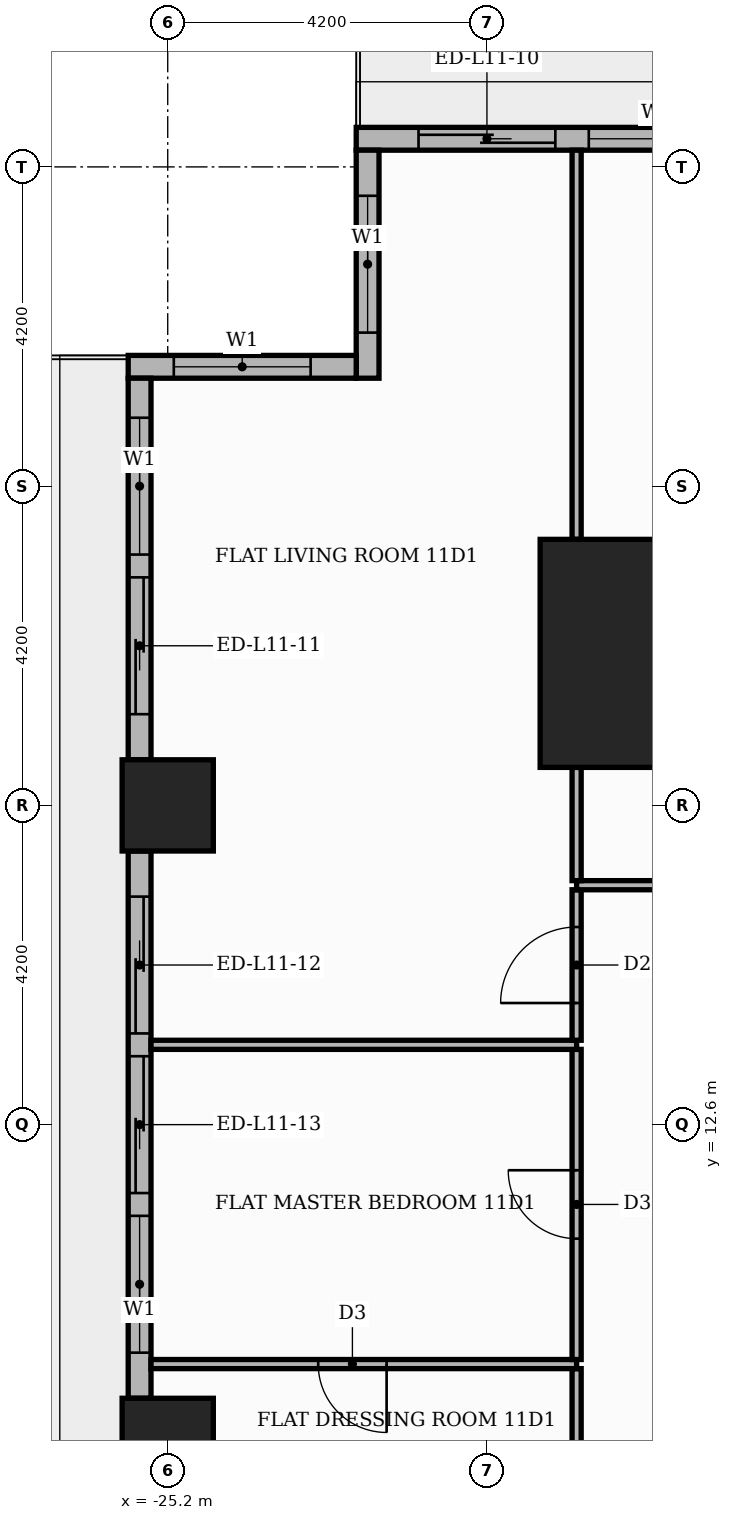
"""IFC4 building model, lengths in metres.
Left out: names, types, materials, properties, quantities, classifications, styles, units other than length and angle.
Written with IfcOpenShell. Run it as: python <this file> out.ifc"""

import sys

from ifc_helpers import new_model, si_unit, direction, frame, frame_2d, origin, origin_2d, place, context, subcontext, project, spatial, rectangle, extrude, element, fill, save


model = new_model("IFC4")
c1 = context("Model", 3, precision=1e-05, world=origin(), true_north=direction((0.0, 1.0)))
c2 = subcontext(c1, "Body", "Model", "MODEL_VIEW")
j1 = project(units=[si_unit("LENGTHUNIT", "METRE"), si_unit("PLANEANGLEUNIT", "RADIAN")], contexts=[c1])
p1 = place(None, origin())
s1 = spatial("IfcSite", under=j1, at=p1, CompositionType="ELEMENT")
p2 = place(p1, origin())
s2 = spatial("IfcBuilding", under=s1, at=p2, CompositionType="ELEMENT")
p3 = place(p2, frame((0.0, 0.0, 50.4)))
s3 = spatial("IfcBuildingStorey", under=s2, at=p3, CompositionType="ELEMENT", Elevation=50.4)
p4 = place(p3, frame((-18.8, 18.8, 0.0), z_axis=(0.0, 0.0, 1.0), x_axis=(1.0, 0.0, 0.0)))
e1 = element("IfcColumn", 1, at=p4, inside=s3, PredefinedType="COLUMN", context=c2, shape_type="SweptSolid", body=[
    extrude(rectangle(XDim=3.0, YDim=3.0, at=origin_2d()), origin(), (0.0, 0.0, 1.0), 3.9),
])
for number, where, z_axis, x_axis in (
    (2, (-25.2, 8.4, 0.0), (0.0, 0.0, 1.0), (1.0, 0.0, 0.0)),
    (3, (-25.2, 16.8, 0.0), (0.0, 0.0, 1.0), (1.0, 0.0, 0.0)),
):
    element("IfcColumn", number, at=place(p3, frame(where, z_axis=z_axis, x_axis=x_axis)), inside=s3, PredefinedType="COLUMN", context=c2, shape_type="SweptSolid", body=[
        extrude(rectangle(XDim=1.2, YDim=1.2, at=origin_2d()), origin(), (0.0, 0.0, 1.0), 3.9),
    ])
p5 = place(p3, frame((-17.4, 25.57, 0.0), z_axis=(0.0, 0.0, 1.0), x_axis=(-1.0, 0.0, 0.0)))
e4 = element("IfcWall", 4, at=p5, inside=s3, PredefinedType="STANDARD", context=c2, shape_type="SweptSolid", body=[
    extrude(rectangle(XDim=5.32, YDim=0.3, at=frame_2d((2.66, 0.0))), origin(), (0.0, 0.0, 1.0), 3.48),
])
p6 = place(p5, frame((2.7, 0.0, 0.0)))
e5 = element("IfcOpeningElement", 5, at=p6, cuts=e4, PredefinedType="OPENING", context=c2, shape_type="SweptSolid", body=[
    extrude(rectangle(XDim=1.8, YDim=2.4, at=frame_2d((0.9, 1.2))), frame((0.0, 0.16, 0.0), z_axis=(0.0, -1.0, 0.0), x_axis=(1.0, 0.0, 0.0)), (0.0, 0.0, 1.0), 0.32),
])
p7 = place(p5, frame((0.46, 0.0, 0.9)))
e6 = element("IfcOpeningElement", 6, at=p7, cuts=e4, PredefinedType="OPENING", context=c2, shape_type="SweptSolid", body=[
    extrude(rectangle(XDim=1.8, YDim=2.1, at=frame_2d((0.9, 1.05))), frame((0.0, 0.16, 0.0), z_axis=(0.0, -1.0, 0.0), x_axis=(1.0, 0.0, 0.0)), (0.0, 0.0, 1.0), 0.32),
])
p8 = place(p3, frame((-22.57, 25.42, 0.0), z_axis=(0.0, 0.0, 1.0), x_axis=(0.0, -1.0, 0.0)))
e7 = element("IfcWall", 7, at=p8, inside=s3, PredefinedType="STANDARD", context=c2, shape_type="SweptSolid", body=[
    extrude(rectangle(XDim=3.0, YDim=0.3, at=frame_2d((1.5, 0.0))), origin(), (0.0, 0.0, 1.0), 3.48),
])
p9 = place(p8, frame((0.6, 0.0, 0.9)))
e8 = element("IfcOpeningElement", 8, at=p9, cuts=e7, PredefinedType="OPENING", context=c2, shape_type="SweptSolid", body=[
    extrude(rectangle(XDim=1.8, YDim=2.1, at=frame_2d((0.9, 1.05))), frame((0.0, 0.16, 0.0), z_axis=(0.0, -1.0, 0.0), x_axis=(1.0, 0.0, 0.0)), (0.0, 0.0, 1.0), 0.32),
])
p10 = place(p3, frame((-22.72, 22.57, 0.0), z_axis=(0.0, 0.0, 1.0), x_axis=(-1.0, 0.0, 0.0)))
e9 = element("IfcWall", 9, at=p10, inside=s3, PredefinedType="STANDARD", context=c2, shape_type="SweptSolid", body=[
    extrude(rectangle(XDim=3.0, YDim=0.3, at=frame_2d((1.5, 0.0))), origin(), (0.0, 0.0, 1.0), 3.48),
])
p11 = place(p10, frame((0.6, 0.0, 0.9)))
e10 = element("IfcOpeningElement", 10, at=p11, cuts=e9, PredefinedType="OPENING", context=c2, shape_type="SweptSolid", body=[
    extrude(rectangle(XDim=1.8, YDim=2.1, at=frame_2d((0.9, 1.05))), frame((0.0, 0.16, 0.0), z_axis=(0.0, -1.0, 0.0), x_axis=(1.0, 0.0, 0.0)), (0.0, 0.0, 1.0), 0.32),
])
p12 = place(p3, frame((-25.57, 22.42, 0.0), z_axis=(0.0, 0.0, 1.0), x_axis=(0.0, -1.0, 0.0)))
e11 = element("IfcWall", 11, at=p12, inside=s3, PredefinedType="STANDARD", context=c2, shape_type="SweptSolid", body=[
    extrude(rectangle(XDim=5.02, YDim=0.3, at=frame_2d((2.51, 0.0))), origin(), (0.0, 0.0, 1.0), 3.48),
])
p13 = place(p12, frame((0.52, 0.0, 0.9)))
e12 = element("IfcOpeningElement", 12, at=p13, cuts=e11, PredefinedType="OPENING", context=c2, shape_type="SweptSolid", body=[
    extrude(rectangle(XDim=1.8, YDim=2.1, at=frame_2d((0.9, 1.05))), frame((0.0, 0.16, 0.0), z_axis=(0.0, -1.0, 0.0), x_axis=(1.0, 0.0, 0.0)), (0.0, 0.0, 1.0), 0.32),
])
p14 = place(p12, frame((2.62, 0.0, 0.0)))
e13 = element("IfcOpeningElement", 13, at=p14, cuts=e11, PredefinedType="OPENING", context=c2, shape_type="SweptSolid", body=[
    extrude(rectangle(XDim=1.8, YDim=2.4, at=frame_2d((0.9, 1.2))), frame((0.0, 0.16, 0.0), z_axis=(0.0, -1.0, 0.0), x_axis=(1.0, 0.0, 0.0)), (0.0, 0.0, 1.0), 0.32),
])
p15 = place(p3, frame((-25.57, 16.2, 0.0), z_axis=(0.0, 0.0, 1.0), x_axis=(0.0, -1.0, 0.0)))
e14 = element("IfcWall", 14, at=p15, inside=s3, PredefinedType="STANDARD", context=c2, shape_type="SweptSolid", body=[
    extrude(rectangle(XDim=7.2, YDim=0.3, at=frame_2d((3.6, 0.0))), origin(), (0.0, 0.0, 1.0), 3.48),
])
p16 = place(p15, frame((0.6, 0.0, 0.0)))
e15 = element("IfcOpeningElement", 15, at=p16, cuts=e14, PredefinedType="OPENING", context=c2, shape_type="SweptSolid", body=[
    extrude(rectangle(XDim=1.8, YDim=2.4, at=frame_2d((0.9, 1.2))), frame((0.0, 0.16, 0.0), z_axis=(0.0, -1.0, 0.0), x_axis=(1.0, 0.0, 0.0)), (0.0, 0.0, 1.0), 0.32),
])
p17 = place(p15, frame((2.7, 0.0, 0.0)))
e16 = element("IfcOpeningElement", 16, at=p17, cuts=e14, PredefinedType="OPENING", context=c2, shape_type="SweptSolid", body=[
    extrude(rectangle(XDim=1.8, YDim=2.4, at=frame_2d((0.9, 1.2))), frame((0.0, 0.16, 0.0), z_axis=(0.0, -1.0, 0.0), x_axis=(1.0, 0.0, 0.0)), (0.0, 0.0, 1.0), 0.32),
])
p18 = place(p15, frame((4.8, 0.0, 0.9)))
e17 = element("IfcOpeningElement", 17, at=p18, cuts=e14, PredefinedType="OPENING", context=c2, shape_type="SweptSolid", body=[
    extrude(rectangle(XDim=1.8, YDim=2.1, at=frame_2d((0.9, 1.05))), frame((0.0, 0.16, 0.0), z_axis=(0.0, -1.0, 0.0), x_axis=(1.0, 0.0, 0.0)), (0.0, 0.0, 1.0), 0.32),
])
p19 = place(p3, frame((-19.82, 7.41, 0.0), z_axis=(0.0, 0.0, 1.0), x_axis=(0.0, 1.0, 0.0)))
e18 = element("IfcWall", 18, at=p19, inside=s3, PredefinedType="PARTITIONING", context=c2, shape_type="SweptSolid", body=[
    extrude(rectangle(XDim=1.98, YDim=0.12, at=frame_2d((0.99, 0.0))), origin(), (0.0, 0.0, 1.0), 3.48),
])
p20 = place(p3, frame((-25.42, 9.45, 0.0), z_axis=(0.0, 0.0, 1.0), x_axis=(1.0, 0.0, 0.0)))
e19 = element("IfcWall", 19, at=p20, inside=s3, PredefinedType="PARTITIONING", context=c2, shape_type="SweptSolid", body=[
    extrude(rectangle(XDim=5.6, YDim=0.12, at=frame_2d((2.8, 0.0))), origin(), (0.0, 0.0, 1.0), 3.48),
])
p21 = place(p20, frame((2.2, 0.0, 0.0)))
e20 = element("IfcOpeningElement", 20, at=p21, cuts=e19, PredefinedType="OPENING", context=c2, shape_type="SweptSolid", body=[
    extrude(rectangle(XDim=0.9, YDim=2.1, at=frame_2d((0.45, 1.05))), frame((0.0, 0.07, 0.0), z_axis=(0.0, -1.0, 0.0), x_axis=(1.0, 0.0, 0.0)), (0.0, 0.0, 1.0), 0.14),
])
p22 = place(p3, frame((-19.82, 9.51, 0.0), z_axis=(0.0, 0.0, 1.0), x_axis=(0.0, 1.0, 0.0)))
e21 = element("IfcWall", 21, at=p22, inside=s3, PredefinedType="PARTITIONING", context=c2, shape_type="SweptSolid", body=[
    extrude(rectangle(XDim=4.08, YDim=0.12, at=frame_2d((2.04, 0.0))), origin(), (0.0, 0.0, 1.0), 3.48),
])
p23 = place(p22, frame((1.59, 0.0, 0.0)))
e22 = element("IfcOpeningElement", 22, at=p23, cuts=e21, PredefinedType="OPENING", context=c2, shape_type="SweptSolid", body=[
    extrude(rectangle(XDim=0.9, YDim=2.1, at=frame_2d((0.45, 1.05))), frame((0.0, 0.07, 0.0), z_axis=(0.0, -1.0, 0.0), x_axis=(1.0, 0.0, 0.0)), (0.0, 0.0, 1.0), 0.14),
])
p24 = place(p3, frame((-25.42, 13.65, 0.0), z_axis=(0.0, 0.0, 1.0), x_axis=(1.0, 0.0, 0.0)))
e23 = element("IfcWall", 23, at=p24, inside=s3, PredefinedType="PARTITIONING", context=c2, shape_type="SweptSolid", body=[
    extrude(rectangle(XDim=5.6, YDim=0.12, at=frame_2d((2.8, 0.0))), origin(), (0.0, 0.0, 1.0), 3.48),
])
p25 = place(p3, frame((-19.82, 13.71, 0.0), z_axis=(0.0, 0.0, 1.0), x_axis=(0.0, 1.0, 0.0)))
e24 = element("IfcWall", 24, at=p25, inside=s3, PredefinedType="PARTITIONING", context=c2, shape_type="SweptSolid", body=[
    extrude(rectangle(XDim=1.98, YDim=0.12, at=frame_2d((0.99, 0.0))), origin(), (0.0, 0.0, 1.0), 3.48),
])
p26 = place(p25, frame((0.49, 0.0, 0.0)))
e25 = element("IfcOpeningElement", 25, at=p26, cuts=e24, PredefinedType="OPENING", context=c2, shape_type="SweptSolid", body=[
    extrude(rectangle(XDim=1.0, YDim=2.1, at=frame_2d((0.5, 1.05))), frame((0.0, 0.07, 0.0), z_axis=(0.0, -1.0, 0.0), x_axis=(1.0, 0.0, 0.0)), (0.0, 0.0, 1.0), 0.14),
])
p27 = place(p3, frame((-19.82, 15.75, 0.0), z_axis=(0.0, 0.0, 1.0), x_axis=(1.0, 0.0, 0.0)))
e26 = element("IfcWall", 26, at=p27, inside=s3, PredefinedType="PARTITIONING", context=c2, shape_type="SweptSolid", body=[
    extrude(rectangle(XDim=6.07, YDim=0.12, at=frame_2d((3.035, 0.0))), origin(), (0.0, 0.0, 1.0), 3.48),
])
p28 = place(p27, frame((2.585, 0.0, 0.0)))
e27 = element("IfcOpeningElement", 27, at=p28, cuts=e26, PredefinedType="OPENING", context=c2, shape_type="SweptSolid", body=[
    extrude(rectangle(XDim=1.0, YDim=2.1, at=frame_2d((0.5, 1.05))), frame((0.0, 0.07, 0.0), z_axis=(0.0, -1.0, 0.0), x_axis=(1.0, 0.0, 0.0)), (0.0, 0.0, 1.0), 0.14),
])
p29 = place(p3, frame((-19.82, 15.81, 0.0), z_axis=(0.0, 0.0, 1.0), x_axis=(0.0, 1.0, 0.0)))
e28 = element("IfcWall", 28, at=p29, inside=s3, PredefinedType="PARTITIONING", context=c2, shape_type="SweptSolid", body=[
    extrude(rectangle(XDim=1.49, YDim=0.12, at=frame_2d((0.745, 0.0))), origin(), (0.0, 0.0, 1.0), 3.48),
])
p30 = place(p3, frame((-19.82, 20.3, 0.0), z_axis=(0.0, 0.0, 1.0), x_axis=(0.0, 1.0, 0.0)))
e29 = element("IfcWall", 29, at=p30, inside=s3, PredefinedType="PARTITIONING", context=c2, shape_type="SweptSolid", body=[
    extrude(rectangle(XDim=5.12, YDim=0.12, at=frame_2d((2.56, 0.0))), origin(), (0.0, 0.0, 1.0), 3.48),
])
p31 = place(p6, origin())
e30 = element("IfcDoor", 30, at=p31, inside=s3, OperationType="SLIDING_TO_LEFT", PredefinedType="DOOR", context=c2, shape_type="SweptSolid", body=[
    extrude(rectangle(XDim=1.8, YDim=2.4, at=frame_2d((0.9, 1.2))), frame((0.0, 0.025, 0.0), z_axis=(0.0, -1.0, 0.0), x_axis=(1.0, 0.0, 0.0)), (0.0, 0.0, 1.0), 0.05),
])
fill(e5, e30)
p32 = place(p7, origin())
e31 = element("IfcWindow", 31, at=p32, inside=s3, PartitioningType="SINGLE_PANEL", PredefinedType="WINDOW", context=c2, shape_type="SweptSolid", body=[
    extrude(rectangle(XDim=1.8, YDim=2.1, at=frame_2d((0.9, 1.05))), frame((0.0, 0.03, 0.0), z_axis=(0.0, -1.0, 0.0), x_axis=(1.0, 0.0, 0.0)), (0.0, 0.0, 1.0), 0.06),
])
fill(e6, e31)
p33 = place(p9, origin())
e32 = element("IfcWindow", 32, at=p33, inside=s3, PartitioningType="SINGLE_PANEL", PredefinedType="WINDOW", context=c2, shape_type="SweptSolid", body=[
    extrude(rectangle(XDim=1.8, YDim=2.1, at=frame_2d((0.9, 1.05))), frame((0.0, 0.03, 0.0), z_axis=(0.0, -1.0, 0.0), x_axis=(1.0, 0.0, 0.0)), (0.0, 0.0, 1.0), 0.06),
])
fill(e8, e32)
p34 = place(p11, origin())
e33 = element("IfcWindow", 33, at=p34, inside=s3, PartitioningType="SINGLE_PANEL", PredefinedType="WINDOW", context=c2, shape_type="SweptSolid", body=[
    extrude(rectangle(XDim=1.8, YDim=2.1, at=frame_2d((0.9, 1.05))), frame((0.0, 0.03, 0.0), z_axis=(0.0, -1.0, 0.0), x_axis=(1.0, 0.0, 0.0)), (0.0, 0.0, 1.0), 0.06),
])
fill(e10, e33)
p35 = place(p13, origin())
e34 = element("IfcWindow", 34, at=p35, inside=s3, PartitioningType="SINGLE_PANEL", PredefinedType="WINDOW", context=c2, shape_type="SweptSolid", body=[
    extrude(rectangle(XDim=1.8, YDim=2.1, at=frame_2d((0.9, 1.05))), frame((0.0, 0.03, 0.0), z_axis=(0.0, -1.0, 0.0), x_axis=(1.0, 0.0, 0.0)), (0.0, 0.0, 1.0), 0.06),
])
fill(e12, e34)
p36 = place(p14, origin())
e35 = element("IfcDoor", 35, at=p36, inside=s3, OperationType="SLIDING_TO_RIGHT", PredefinedType="DOOR", context=c2, shape_type="SweptSolid", body=[
    extrude(rectangle(XDim=1.8, YDim=2.4, at=frame_2d((0.9, 1.2))), frame((0.0, 0.025, 0.0), z_axis=(0.0, -1.0, 0.0), x_axis=(1.0, 0.0, 0.0)), (0.0, 0.0, 1.0), 0.05),
])
fill(e13, e35)
p37 = place(p16, origin())
e36 = element("IfcDoor", 36, at=p37, inside=s3, OperationType="SLIDING_TO_LEFT", PredefinedType="DOOR", context=c2, shape_type="SweptSolid", body=[
    extrude(rectangle(XDim=1.8, YDim=2.4, at=frame_2d((0.9, 1.2))), frame((0.0, 0.025, 0.0), z_axis=(0.0, -1.0, 0.0), x_axis=(1.0, 0.0, 0.0)), (0.0, 0.0, 1.0), 0.05),
])
fill(e15, e36)
p38 = place(p17, origin())
e37 = element("IfcDoor", 37, at=p38, inside=s3, OperationType="SLIDING_TO_RIGHT", PredefinedType="DOOR", context=c2, shape_type="SweptSolid", body=[
    extrude(rectangle(XDim=1.8, YDim=2.4, at=frame_2d((0.9, 1.2))), frame((0.0, 0.025, 0.0), z_axis=(0.0, -1.0, 0.0), x_axis=(1.0, 0.0, 0.0)), (0.0, 0.0, 1.0), 0.05),
])
fill(e16, e37)
p39 = place(p18, origin())
e38 = element("IfcWindow", 38, at=p39, inside=s3, PartitioningType="SINGLE_PANEL", PredefinedType="WINDOW", context=c2, shape_type="SweptSolid", body=[
    extrude(rectangle(XDim=1.8, YDim=2.1, at=frame_2d((0.9, 1.05))), frame((0.0, 0.03, 0.0), z_axis=(0.0, -1.0, 0.0), x_axis=(1.0, 0.0, 0.0)), (0.0, 0.0, 1.0), 0.06),
])
fill(e17, e38)
p40 = place(p26, origin())
e39 = element("IfcDoor", 39, at=p40, inside=s3, OperationType="SINGLE_SWING_LEFT", PredefinedType="DOOR", context=c2, shape_type="SweptSolid", body=[
    extrude(rectangle(XDim=1.0, YDim=2.1, at=frame_2d((0.5, 1.05))), frame((0.0, 0.025, 0.0), z_axis=(0.0, -1.0, 0.0), x_axis=(1.0, 0.0, 0.0)), (0.0, 0.0, 1.0), 0.05),
])
fill(e25, e39)
p41 = place(p23, origin())
e40 = element("IfcDoor", 40, at=p41, inside=s3, OperationType="SINGLE_SWING_RIGHT", PredefinedType="DOOR", context=c2, shape_type="SweptSolid", body=[
    extrude(rectangle(XDim=0.9, YDim=2.1, at=frame_2d((0.45, 1.05))), frame((0.0, 0.025, 0.0), z_axis=(0.0, -1.0, 0.0), x_axis=(1.0, 0.0, 0.0)), (0.0, 0.0, 1.0), 0.05),
])
fill(e22, e40)
p42 = place(p21, frame((0.9, 0.0, 0.0), z_axis=(0.0, 0.0, 1.0), x_axis=(-1.0, 0.0, 0.0)))
e41 = element("IfcDoor", 41, at=p42, inside=s3, OperationType="SINGLE_SWING_RIGHT", PredefinedType="DOOR", context=c2, shape_type="SweptSolid", body=[
    extrude(rectangle(XDim=0.9, YDim=2.1, at=frame_2d((0.45, 1.05))), frame((0.0, 0.025, 0.0), z_axis=(0.0, -1.0, 0.0), x_axis=(1.0, 0.0, 0.0)), (0.0, 0.0, 1.0), 0.05),
])
fill(e20, e41)
save(model, sys.argv[1])
